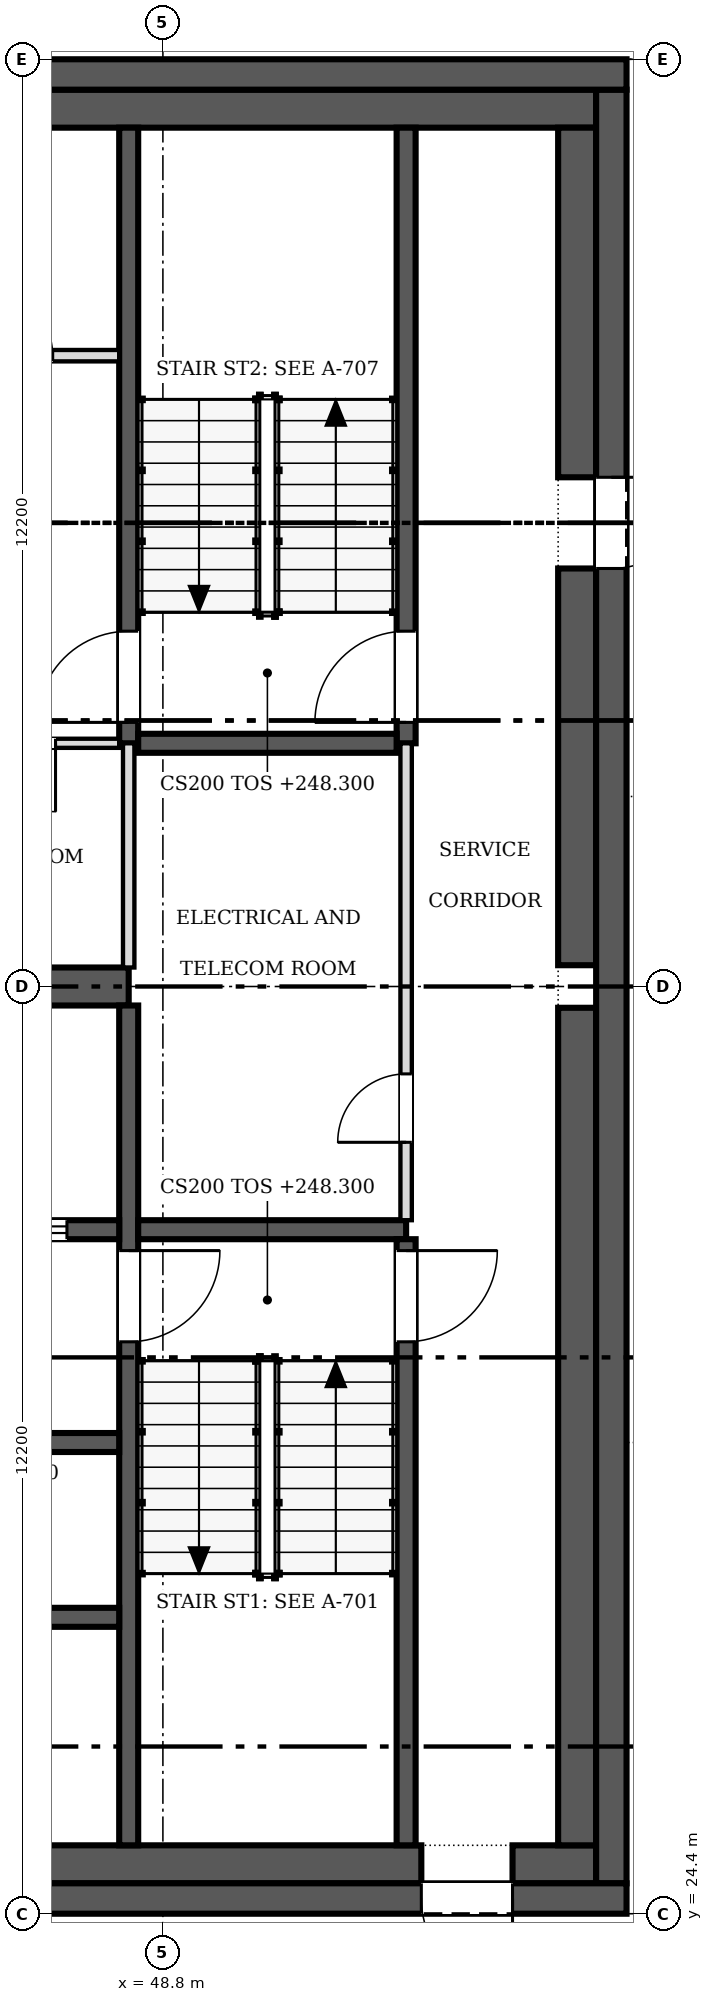
"""IFC4 building model, lengths in metres.
Left out: names, types, materials, properties, quantities, classifications, styles, units other than length and angle.
Written with IfcOpenShell. Run it as: python <this file> out.ifc"""

import sys

from ifc_helpers import new_model, si_unit, direction, frame, frame_2d, origin, place, context, subcontext, project, spatial, rectangle, extrude, source, transform, mapped, element, fill, save


model = new_model("IFC4")
c1 = context("Model", 3, precision=1e-05, world=origin(), true_north=direction((0.0, 1.0)))
c2 = subcontext(c1, "Body", "Model", "MODEL_VIEW")
j1 = project(units=[si_unit("LENGTHUNIT", "METRE"), si_unit("PLANEANGLEUNIT", "RADIAN")], contexts=[c1])
p1 = place(None, origin())
s1 = spatial("IfcSite", under=j1, at=p1, CompositionType="ELEMENT")
p2 = place(p1, origin())
s2 = spatial("IfcBuilding", under=s1, at=p2, CompositionType="ELEMENT")
p3 = place(p2, frame((0.0, 0.0, 248.3)))
s3 = spatial("IfcBuildingStorey", under=s2, at=p3, CompositionType="ELEMENT", Elevation=248.3)
p4 = place(p3, frame((54.9, 24.6, 0.0), z_axis=(0.0, 0.0, 1.0), x_axis=(-1.0, 0.0, 0.0)))
e1 = element("IfcWall", 1, at=p4, inside=s3, PredefinedType="SHEAR", context=c2, shape_type="SweptSolid", body=[
    extrude(rectangle(XDim=24.4, YDim=0.4, at=frame_2d((12.2, 0.0))), origin(), (0.0, 0.0, 1.0), 3.8),
])
m1 = source(origin(), c2, "Body", "SweptSolid", [
    extrude(rectangle(XDim=1.2, YDim=2.1, at=frame_2d((0.6, 1.05))), frame((0.0, 0.21, 0.0), z_axis=(0.0, -1.0, 0.0), x_axis=(1.0, 0.0, 0.0)), (0.0, 0.0, 1.0), 0.42),
])
p5 = place(p4, frame((1.5, 0.0, 0.0)))
e2 = element("IfcOpeningElement", 2, at=p5, cuts=e1, PredefinedType="OPENING", context=c2, shape_type="MappedRepresentation", body=[
    mapped(m1, transform((0.0, 0.0, 0.0), scale=1.0)),
])
p6 = place(p3, frame((30.5, 48.6, 0.0), z_axis=(0.0, 0.0, 1.0), x_axis=(1.0, 0.0, 0.0)))
e3 = element("IfcWall", 3, at=p6, inside=s3, PredefinedType="SHEAR", context=c2, shape_type="SweptSolid", body=[
    extrude(rectangle(XDim=24.4, YDim=0.4, at=frame_2d((12.2, 0.0))), origin(), (0.0, 0.0, 1.0), 3.8),
])
p7 = place(p3, frame((54.7, 48.4, 0.0), z_axis=(0.0, 0.0, 1.0), x_axis=(0.0, -1.0, 0.0)))
e4 = element("IfcWall", 4, at=p7, inside=s3, PredefinedType="SHEAR", context=c2, shape_type="SweptSolid", body=[
    extrude(rectangle(XDim=23.6, YDim=0.4, at=frame_2d((11.8, 0.0))), origin(), (0.0, 0.0, 1.0), 3.8),
])
p8 = place(p7, frame((5.1, 0.0, 0.0)))
e5 = element("IfcOpeningElement", 5, at=p8, cuts=e4, PredefinedType="OPENING", context=c2, shape_type="MappedRepresentation", body=[
    mapped(m1, transform((0.0, 0.0, 0.0), scale=1.0)),
])
p9 = place(p3, frame((30.9, 25.05, 0.0), z_axis=(0.0, 0.0, 1.0), x_axis=(1.0, 0.0, 0.0)))
e6 = element("IfcWall", 6, at=p9, inside=s3, PredefinedType="SOLIDWALL", context=c2, shape_type="SweptSolid", body=[
    extrude(rectangle(XDim=21.3, YDim=0.5, at=frame_2d((10.65, 0.0))), origin(), (0.0, 0.0, 1.0), 3.8),
])
p10 = place(p3, frame((53.4, 25.05, 0.0), z_axis=(0.0, 0.0, 1.0), x_axis=(1.0, 0.0, 0.0)))
e7 = element("IfcWall", 7, at=p10, inside=s3, PredefinedType="SOLIDWALL", context=c2, shape_type="SweptSolid", body=[
    extrude(rectangle(XDim=1.1, YDim=0.5, at=frame_2d((0.55, 0.0))), origin(), (0.0, 0.0, 1.0), 3.8),
])
p11 = place(p3, frame((30.9, 48.15, 0.0), z_axis=(0.0, 0.0, 1.0), x_axis=(1.0, 0.0, 0.0)))
e8 = element("IfcWall", 8, at=p11, inside=s3, PredefinedType="SOLIDWALL", context=c2, shape_type="SweptSolid", body=[
    extrude(rectangle(XDim=23.6, YDim=0.5, at=frame_2d((11.8, 0.0))), origin(), (0.0, 0.0, 1.0), 3.8),
])
p12 = place(p3, frame((54.25, 25.3, 0.0), z_axis=(0.0, 0.0, 1.0), x_axis=(0.0, 1.0, 0.0)))
e9 = element("IfcWall", 9, at=p12, inside=s3, PredefinedType="SOLIDWALL", context=c2, shape_type="SweptSolid", body=[
    extrude(rectangle(XDim=11.02, YDim=0.5, at=frame_2d((5.51, 0.0))), origin(), (0.0, 0.0, 1.0), 3.8),
])
p13 = place(p3, frame((54.25, 36.88, 0.0), z_axis=(0.0, 0.0, 1.0), x_axis=(0.0, 1.0, 0.0)))
e10 = element("IfcWall", 10, at=p13, inside=s3, PredefinedType="SOLIDWALL", context=c2, shape_type="SweptSolid", body=[
    extrude(rectangle(XDim=5.22, YDim=0.5, at=frame_2d((2.61, 0.0))), origin(), (0.0, 0.0, 1.0), 3.8),
])
p14 = place(p3, frame((54.25, 43.3, 0.0), z_axis=(0.0, 0.0, 1.0), x_axis=(0.0, 1.0, 0.0)))
e11 = element("IfcWall", 11, at=p14, inside=s3, PredefinedType="SOLIDWALL", context=c2, shape_type="SweptSolid", body=[
    extrude(rectangle(XDim=4.6, YDim=0.5, at=frame_2d((2.3, 0.0))), origin(), (0.0, 0.0, 1.0), 3.8),
])
p15 = place(p3, frame((31.4, 36.6, 0.0), z_axis=(0.0, 0.0, 1.0), x_axis=(1.0, 0.0, 0.0)))
e12 = element("IfcWall", 12, at=p15, inside=s3, PredefinedType="SHEAR", context=c2, shape_type="SweptSolid", body=[
    extrude(rectangle(XDim=16.95, YDim=0.5, at=frame_2d((8.475, 0.0))), origin(), (0.0, 0.0, 1.0), 3.8),
])
p16 = place(p3, frame((48.35, 36.35, 0.0), z_axis=(0.0, 0.0, 1.0), x_axis=(0.0, -1.0, 0.0)))
e13 = element("IfcWall", 13, at=p16, inside=s3, PredefinedType="SOLIDWALL", context=c2, shape_type="SweptSolid", body=[
    extrude(rectangle(XDim=11.05, YDim=0.25, at=frame_2d((5.525, 0.0))), origin(), (0.0, 0.0, 1.0), 3.8),
])
m2 = source(origin(), c2, "Body", "SweptSolid", [
    extrude(rectangle(XDim=1.2, YDim=2.1, at=frame_2d((0.6, 1.05))), frame((0.0, 0.135, 0.0), z_axis=(0.0, -1.0, 0.0), x_axis=(1.0, 0.0, 0.0)), (0.0, 0.0, 1.0), 0.27),
])
p17 = place(p16, frame((3.225, 0.0, 0.0)))
e14 = element("IfcOpeningElement", 14, at=p17, cuts=e13, PredefinedType="OPENING", context=c2, shape_type="MappedRepresentation", body=[
    mapped(m2, transform((0.0, 0.0, 0.0), scale=1.0)),
])
p18 = place(p3, frame((48.225, 33.4, 0.0), z_axis=(0.0, 0.0, 1.0), x_axis=(-1.0, 0.0, 0.0)))
e15 = element("IfcWall", 15, at=p18, inside=s3, PredefinedType="SOLIDWALL", context=c2, shape_type="SweptSolid", body=[
    extrude(rectangle(XDim=5.275, YDim=0.25, at=frame_2d((2.638, 0.0))), origin(), (0.0, 0.0, 1.0), 3.8),
])
p19 = place(p18, frame((3.512, 0.0, 0.0)))
e16 = element("IfcOpeningElement", 16, at=p19, cuts=e15, PredefinedType="OPENING", context=c2, shape_type="MappedRepresentation", body=[
    mapped(m2, transform((0.0, 0.0, 0.0), scale=1.0)),
])
p20 = place(p18, frame((0.688, 0.0, 0.0)))
e17 = element("IfcOpeningElement", 17, at=p20, cuts=e15, PredefinedType="OPENING", context=c2, shape_type="MappedRepresentation", body=[
    mapped(m2, transform((0.0, 0.0, 0.0), scale=1.0)),
])
p21 = place(p3, frame((48.475, 33.4, 0.0), z_axis=(0.0, 0.0, 1.0), x_axis=(1.0, 0.0, 0.0)))
e18 = element("IfcWall", 18, at=p21, inside=s3, PredefinedType="SOLIDWALL", context=c2, shape_type="SweptSolid", body=[
    extrude(rectangle(XDim=3.525, YDim=0.25, at=frame_2d((1.762, 0.0))), origin(), (0.0, 0.0, 1.0), 3.8),
])
p22 = place(p3, frame((48.35, 47.9, 0.0), z_axis=(0.0, 0.0, 1.0), x_axis=(0.0, -1.0, 0.0)))
e19 = element("IfcWall", 19, at=p22, inside=s3, PredefinedType="SOLIDWALL", context=c2, shape_type="SweptSolid", body=[
    extrude(rectangle(XDim=8.1, YDim=0.25, at=frame_2d((4.05, 0.0))), origin(), (0.0, 0.0, 1.0), 3.8),
])
p23 = place(p22, frame((6.625, 0.0, 0.0)))
e20 = element("IfcOpeningElement", 20, at=p23, cuts=e19, PredefinedType="OPENING", context=c2, shape_type="MappedRepresentation", body=[
    mapped(m2, transform((0.0, 0.0, 0.0), scale=1.0)),
])
p24 = place(p3, frame((52.0, 25.3, 0.0), z_axis=(0.0, 0.0, 1.0), x_axis=(0.0, 1.0, 0.0)))
e21 = element("IfcWall", 21, at=p24, inside=s3, PredefinedType="SOLIDWALL", context=c2, shape_type="SweptSolid", body=[
    extrude(rectangle(XDim=7.975, YDim=0.25, at=frame_2d((3.987, 0.0))), origin(), (0.0, 0.0, 1.0), 3.8),
])
p25 = place(p24, frame((6.625, 0.0, 0.0)))
e22 = element("IfcOpeningElement", 22, at=p25, cuts=e21, PredefinedType="OPENING", context=c2, shape_type="MappedRepresentation", body=[
    mapped(m2, transform((0.0, 0.0, 0.0), scale=1.0)),
])
p26 = place(p3, frame((52.0, 39.8, 0.0), z_axis=(0.0, 0.0, 1.0), x_axis=(0.0, 1.0, 0.0)))
e23 = element("IfcWall", 23, at=p26, inside=s3, PredefinedType="SOLIDWALL", context=c2, shape_type="SweptSolid", body=[
    extrude(rectangle(XDim=8.1, YDim=0.25, at=frame_2d((4.05, 0.0))), origin(), (0.0, 0.0, 1.0), 3.8),
])
p27 = place(p26, frame((0.275, 0.0, 0.0)))
e24 = element("IfcOpeningElement", 24, at=p27, cuts=e23, PredefinedType="OPENING", context=c2, shape_type="MappedRepresentation", body=[
    mapped(m2, transform((0.0, 0.0, 0.0), scale=1.0)),
])
for number, where, z_axis, x_axis in (
    (25, (42.95, 28.3, 0.0), (0.0, 0.0, 1.0), (1.0, 0.0, 0.0)),
    (26, (42.95, 30.6, 0.0), (0.0, 0.0, 1.0), (1.0, 0.0, 0.0)),
):
    element("IfcWall", number, at=place(p3, frame(where, z_axis=z_axis, x_axis=x_axis)), inside=s3, PredefinedType="SOLIDWALL", context=c2, shape_type="SweptSolid", body=[
        extrude(rectangle(XDim=5.275, YDim=0.25, at=frame_2d((2.638, 0.0))), origin(), (0.0, 0.0, 1.0), 3.8),
    ])
p28 = place(p3, frame((48.475, 39.8, 0.0), z_axis=(0.0, 0.0, 1.0), x_axis=(1.0, 0.0, 0.0)))
e27 = element("IfcWall", 27, at=p28, inside=s3, PredefinedType="SOLIDWALL", context=c2, shape_type="SweptSolid", body=[
    extrude(rectangle(XDim=3.4, YDim=0.25, at=frame_2d((1.7, 0.0))), origin(), (0.0, 0.0, 1.0), 3.8),
])
p29 = place(p3, frame((52.0, 33.525, 0.0), z_axis=(0.0, 0.0, 1.0), x_axis=(0.0, 1.0, 0.0)))
e28 = element("IfcWall", 28, at=p29, inside=s3, PredefinedType="PARTITIONING", context=c2, shape_type="SweptSolid", body=[
    extrude(rectangle(XDim=6.275, YDim=0.15, at=frame_2d((3.138, 0.0))), origin(), (0.0, 0.0, 1.0), 3.6),
])
m3 = source(origin(), c2, "Body", "SweptSolid", [
    extrude(rectangle(XDim=0.9, YDim=2.1, at=frame_2d((0.45, 1.05))), frame((0.0, 0.085, 0.0), z_axis=(0.0, -1.0, 0.0), x_axis=(1.0, 0.0, 0.0)), (0.0, 0.0, 1.0), 0.17),
])
p30 = place(p29, frame((1.025, 0.0, 0.0)))
e29 = element("IfcOpeningElement", 29, at=p30, cuts=e28, PredefinedType="OPENING", context=c2, shape_type="MappedRepresentation", body=[
    mapped(m3, transform((0.0, 0.0, 0.0), scale=1.0)),
])
p31 = place(p3, frame((48.225, 39.8, 0.0), z_axis=(0.0, 0.0, 1.0), x_axis=(-1.0, 0.0, 0.0)))
e30 = element("IfcWall", 30, at=p31, inside=s3, PredefinedType="PARTITIONING", context=c2, shape_type="SweptSolid", body=[
    extrude(rectangle(XDim=5.275, YDim=0.12, at=frame_2d((2.638, 0.0))), origin(), (0.0, 0.0, 1.0), 3.6),
])
m4 = source(origin(), c2, "Body", "SweptSolid", [
    extrude(rectangle(XDim=0.9, YDim=2.1, at=frame_2d((0.45, 1.05))), frame((0.0, 0.07, 0.0), z_axis=(0.0, -1.0, 0.0), x_axis=(1.0, 0.0, 0.0)), (0.0, 0.0, 1.0), 0.14),
])
p32 = place(p31, frame((3.663, 0.0, 0.0)))
e31 = element("IfcOpeningElement", 31, at=p32, cuts=e30, PredefinedType="OPENING", context=c2, shape_type="MappedRepresentation", body=[
    mapped(m4, transform((0.0, 0.0, 0.0), scale=1.0)),
])
p33 = place(p31, frame((0.837, 0.0, 0.0)))
e32 = element("IfcOpeningElement", 32, at=p33, cuts=e30, PredefinedType="OPENING", context=c2, shape_type="MappedRepresentation", body=[
    mapped(m4, transform((0.0, 0.0, 0.0), scale=1.0)),
])
p34 = place(p3, frame((48.35, 36.85, 0.0), z_axis=(0.0, 0.0, 1.0), x_axis=(0.0, 1.0, 0.0)))
e33 = element("IfcWall", 33, at=p34, inside=s3, PredefinedType="PARTITIONING", context=c2, shape_type="SweptSolid", body=[
    extrude(rectangle(XDim=2.95, YDim=0.15, at=frame_2d((1.475, 0.0))), origin(), (0.0, 0.0, 1.0), 3.6),
])
p35 = place(p3, frame((45.6, 44.9, 0.0), z_axis=(0.0, 0.0, 1.0), x_axis=(1.0, 0.0, 0.0)))
e34 = element("IfcWall", 34, at=p35, inside=s3, PredefinedType="PARTITIONING", context=c2, shape_type="SweptSolid", body=[
    extrude(rectangle(XDim=2.625, YDim=0.15, at=frame_2d((1.312, 0.0))), origin(), (0.0, 0.0, 1.0), 3.6),
])
p36 = place(p35, frame((0.85, 0.0, 0.0)))
e35 = element("IfcOpeningElement", 35, at=p36, cuts=e34, PredefinedType="OPENING", context=c2, shape_type="MappedRepresentation", body=[
    mapped(m3, transform((0.0, 0.0, 0.0), scale=1.0)),
])
m5 = source(origin(), c2, "Body", "SweptSolid", [
    extrude(rectangle(XDim=1.2, YDim=2.1, at=frame_2d((0.6, 1.05))), frame((0.0, 0.025, 0.0), z_axis=(0.0, -1.0, 0.0), x_axis=(1.0, 0.0, 0.0)), (0.0, 0.0, 1.0), 0.05),
])
p37 = place(p5, origin())
e36 = element("IfcDoor", 36, at=p37, inside=s3, OperationType="SINGLE_SWING_LEFT", PredefinedType="DOOR", context=c2, shape_type="MappedRepresentation", body=[
    mapped(m5, transform((0.0, 0.0, 0.0), scale=1.0)),
])
fill(e2, e36)
p38 = place(p8, origin())
e37 = element("IfcDoor", 37, at=p38, inside=s3, OperationType="SINGLE_SWING_LEFT", PredefinedType="DOOR", context=c2, shape_type="MappedRepresentation", body=[
    mapped(m5, transform((0.0, 0.0, 0.0), scale=1.0)),
])
fill(e5, e37)
p39 = place(p17, origin())
e38 = element("IfcDoor", 38, at=p39, inside=s3, OperationType="SINGLE_SWING_LEFT", PredefinedType="DOOR", context=c2, shape_type="MappedRepresentation", body=[
    mapped(m5, transform((0.0, 0.0, 0.0), scale=1.0)),
])
fill(e14, e38)
p40 = place(p20, origin())
e39 = element("IfcDoor", 39, at=p40, inside=s3, OperationType="DOUBLE_DOOR_SLIDING", PredefinedType="DOOR", context=c2, shape_type="MappedRepresentation", body=[
    mapped(m5, transform((0.0, 0.0, 0.0), scale=1.0)),
])
fill(e17, e39)
p41 = place(p23, origin())
e40 = element("IfcDoor", 40, at=p41, inside=s3, OperationType="SINGLE_SWING_RIGHT", PredefinedType="DOOR", context=c2, shape_type="MappedRepresentation", body=[
    mapped(m5, transform((0.0, 0.0, 0.0), scale=1.0)),
])
fill(e20, e40)
p42 = place(p25, origin())
e41 = element("IfcDoor", 41, at=p42, inside=s3, OperationType="SINGLE_SWING_RIGHT", PredefinedType="DOOR", context=c2, shape_type="MappedRepresentation", body=[
    mapped(m5, transform((0.0, 0.0, 0.0), scale=1.0)),
])
fill(e22, e41)
p43 = place(p27, origin())
e42 = element("IfcDoor", 42, at=p43, inside=s3, OperationType="SINGLE_SWING_LEFT", PredefinedType="DOOR", context=c2, shape_type="MappedRepresentation", body=[
    mapped(m5, transform((0.0, 0.0, 0.0), scale=1.0)),
])
fill(e24, e42)
m6 = source(origin(), c2, "Body", "SweptSolid", [
    extrude(rectangle(XDim=0.9, YDim=2.1, at=frame_2d((0.45, 1.05))), frame((0.0, 0.025, 0.0), z_axis=(0.0, -1.0, 0.0), x_axis=(1.0, 0.0, 0.0)), (0.0, 0.0, 1.0), 0.05),
])
p44 = place(p30, origin())
e43 = element("IfcDoor", 43, at=p44, inside=s3, OperationType="SINGLE_SWING_LEFT", PredefinedType="DOOR", context=c2, shape_type="MappedRepresentation", body=[
    mapped(m6, transform((0.0, 0.0, 0.0), scale=1.0)),
])
fill(e29, e43)
p45 = place(p33, origin())
e44 = element("IfcDoor", 44, at=p45, inside=s3, OperationType="SINGLE_SWING_LEFT", PredefinedType="DOOR", context=c2, shape_type="MappedRepresentation", body=[
    mapped(m6, transform((0.0, 0.0, 0.0), scale=1.0)),
])
fill(e32, e44)
save(model, sys.argv[1])
